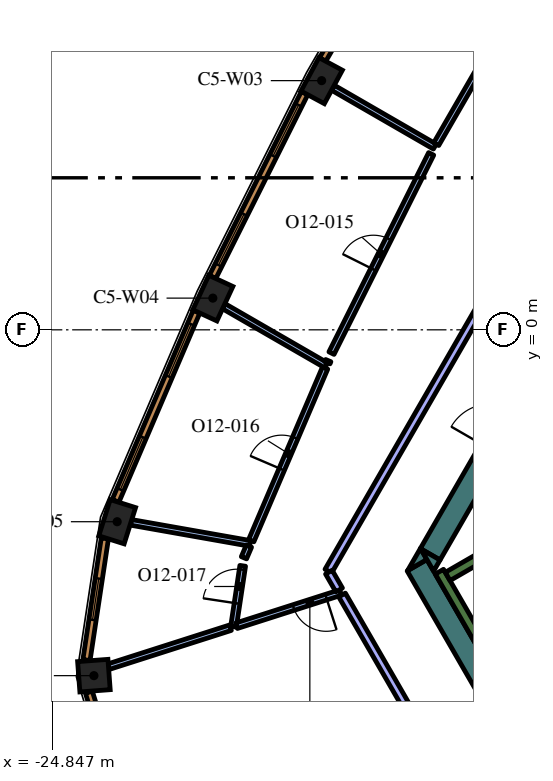
"""IFC4 building model, lengths in metres.
Left out: names, types, materials, properties, quantities, classifications, styles, units other than length and angle.
Written with IfcOpenShell. Run it as: python <this file> out.ifc"""

import sys

from ifc_helpers import new_model, si_unit, direction, frame, frame_2d, origin, origin_2d, place, context, subcontext, project, spatial, polyline, rectangle, outline, extrude, element, fill, save


model = new_model("IFC4")
c1 = context("Model", 3, precision=1e-05, world=origin(), true_north=direction((0.0, 1.0)))
c2 = subcontext(c1, "Body", "Model", "MODEL_VIEW")
j1 = project(units=[si_unit("LENGTHUNIT", "METRE"), si_unit("PLANEANGLEUNIT", "RADIAN")], contexts=[c1])
p1 = place(None, origin())
s1 = spatial("IfcSite", under=j1, at=p1, CompositionType="ELEMENT")
p2 = place(p1, origin())
s2 = spatial("IfcBuilding", under=s1, at=p2, CompositionType="ELEMENT")
p3 = place(p2, frame((0.0, 0.0, 279.6)))
s3 = spatial("IfcBuildingStorey", under=s2, at=p3, CompositionType="ELEMENT", Elevation=279.6)
for number, where, z_axis, x_axis in (
    (1, (-17.756, 6.557, 0.0), (0.0, 0.0, 1.0), (-0.474, -0.881, 0.0)),
    (2, (-20.619, 0.834, 0.0), (0.0, 0.0, 1.0), (-0.421, -0.907, 0.0)),
    (3, (-23.136, -5.049, 0.0), (0.0, 0.0, 1.0), (-0.3, -0.954, 0.0)),
):
    element("IfcColumn", number, at=place(p3, frame(where, z_axis=z_axis, x_axis=x_axis)), inside=s3, PredefinedType="COLUMN", context=c2, shape_type="SweptSolid", body=[
        extrude(rectangle(XDim=1.0, YDim=0.7, at=origin_2d()), origin(), (0.0, 0.0, 1.0), 4.2),
    ])
p4 = place(p3, frame((-23.748, -9.1, 0.0), z_axis=(0.0, 0.0, 1.0), x_axis=(0.074510546573, -0.997220225652, 0.0)))
e4 = element("IfcColumn", 4, at=p4, inside=s3, PredefinedType="COLUMN", context=c2, shape_type="SweptSolid", body=[
    extrude(rectangle(XDim=0.8, YDim=0.8, at=origin_2d()), origin(), (0.0, 0.0, 1.0), 4.2),
])
p5 = place(p3, frame((-13.333, -9.506, 0.0), z_axis=(0.0, 0.0, 1.0), x_axis=(-0.500019073792, 0.866014391245, 0.0)))
e5 = element("IfcWall", 5, at=p5, inside=s3, PredefinedType="SOLIDWALL", context=c2, shape_type="SweptSolid", body=[
    extrude(rectangle(XDim=3.823, YDim=0.6, at=frame_2d((1.912, 0.0))), origin(), (0.0, 0.0, 1.0), 4.2),
])
p6 = place(p3, origin())
e6 = element("IfcWall", 6, at=p6, inside=s3, PredefinedType="SOLIDWALL", context=c2, shape_type="SweptSolid", body=[
    extrude(outline(polyline([(-14.987, -6.043), (-15.493, -6.335), (-15.156, -5.75), (-14.987, -6.043)])), origin(), (0.0, 0.0, 1.0), 4.2),
])
p7 = place(p3, frame((-13.432, -3.364, 0.0), z_axis=(0.0, 0.0, 1.0), x_axis=(-0.499960127962, -0.866048422692, 0.0)))
e7 = element("IfcWall", 7, at=p7, inside=s3, PredefinedType="SOLIDWALL", context=c2, shape_type="SweptSolid", body=[
    extrude(rectangle(XDim=2.934, YDim=0.6, at=frame_2d((1.467, 0.0))), origin(), (0.0, 0.0, 1.0), 4.2),
])
e8 = element("IfcWall", 8, at=p6, inside=s3, PredefinedType="SOLIDWALL", context=c2, shape_type="SweptSolid", body=[
    extrude(outline(polyline([(-14.809, -6.35), (-15.147, -5.764), (-14.64, -6.057), (-14.809, -6.35)])), origin(), (0.0, 0.0, 1.0), 4.2),
])
p8 = place(p3, frame((-12.84, -9.511, 0.0), z_axis=(0.0, 0.0, 1.0), x_axis=(-0.499997733992, 0.866026712061, 0.0)))
e9 = element("IfcWall", 9, at=p8, inside=s3, PredefinedType="SOLIDWALL", context=c2, shape_type="SweptSolid", body=[
    extrude(rectangle(XDim=3.634, YDim=0.25, at=frame_2d((1.817, 0.0))), origin(), (0.0, 0.0, 1.0), 4.2),
])
p9 = place(p3, frame((-14.44, -6.49, 0.0), z_axis=(0.0, 0.0, 1.0), x_axis=(0.866022966069, 0.500004222222, 0.0)))
e10 = element("IfcWall", 10, at=p9, inside=s3, PredefinedType="SOLIDWALL", context=c2, shape_type="SweptSolid", body=[
    extrude(rectangle(XDim=6.8, YDim=0.25, at=frame_2d((3.4, 0.0))), origin(), (0.0, 0.0, 1.0), 4.2),
])
p10 = place(p3, frame((-14.777, 4.822, 0.0), z_axis=(0.0, 0.0, 1.0), x_axis=(-0.865992557167, 0.500056887695, 0.0)))
e11 = element("IfcWall", 11, at=p10, inside=s3, PredefinedType="PARTITIONING", context=c2, shape_type="SweptSolid", body=[
    extrude(rectangle(XDim=3.096, YDim=0.15, at=frame_2d((1.548, 0.0))), origin(), (0.0, 0.0, 1.0), 3.55),
])
p11 = place(p3, frame((-14.74, 4.887, 0.0), z_axis=(0.0, 0.0, 1.0), x_axis=(0.500007141444, 0.86602128063, 0.0)))
e12 = element("IfcWall", 12, at=p11, inside=s3, PredefinedType="PARTITIONING", context=c2, shape_type="SweptSolid", body=[
    extrude(rectangle(XDim=6.137, YDim=0.15, at=frame_2d((3.068, 0.0))), origin(), (0.0, 0.0, 1.0), 3.55),
])
p12 = place(p11, frame((2.637, 0.0, 0.0)))
e13 = element("IfcOpeningElement", 13, at=p12, cuts=e12, PredefinedType="OPENING", context=c2, shape_type="SweptSolid", body=[
    extrude(rectangle(XDim=0.9, YDim=2.1, at=frame_2d((0.45, 1.05))), frame((0.0, 0.085, 0.0), z_axis=(0.0, -1.0, 0.0), x_axis=(1.0, 0.0, 0.0)), (0.0, 0.0, 1.0), 0.17),
])
p13 = place(p3, frame((-17.635, -0.936, 0.0), z_axis=(0.0, 0.0, 1.0), x_axis=(-0.866044607523, 0.499966736674, 0.0)))
e14 = element("IfcWall", 14, at=p13, inside=s3, PredefinedType="PARTITIONING", context=c2, shape_type="SweptSolid", body=[
    extrude(rectangle(XDim=3.115, YDim=0.15, at=frame_2d((1.557, 0.0))), origin(), (0.0, 0.0, 1.0), 3.55),
])
p14 = place(p3, frame((-17.497, -0.613, 0.0), z_axis=(0.0, 0.0, 1.0), x_axis=(0.447480081559, 0.89429389834, 0.0)))
e15 = element("IfcWall", 15, at=p14, inside=s3, PredefinedType="PARTITIONING", context=c2, shape_type="SweptSolid", body=[
    extrude(rectangle(XDim=5.863, YDim=0.15, at=frame_2d((2.931, 0.0))), origin(), (0.0, 0.0, 1.0), 3.55),
])
p15 = place(p14, frame((2.463, 0.0, 0.0)))
e16 = element("IfcOpeningElement", 16, at=p15, cuts=e15, PredefinedType="OPENING", context=c2, shape_type="SweptSolid", body=[
    extrude(rectangle(XDim=0.9, YDim=2.1, at=frame_2d((0.45, 1.05))), frame((0.0, 0.085, 0.0), z_axis=(0.0, -1.0, 0.0), x_axis=(1.0, 0.0, 0.0)), (0.0, 0.0, 1.0), 0.17),
])
p16 = place(p3, frame((-17.581, -0.81, 0.0), z_axis=(0.0, 0.0, 1.0), x_axis=(-0.390033474923, -0.92080067791, 0.0)))
e17 = element("IfcWall", 17, at=p16, inside=s3, PredefinedType="PARTITIONING", context=c2, shape_type="SweptSolid", body=[
    extrude(rectangle(XDim=0.061, YDim=0.15, at=frame_2d((0.03, 0.0))), origin(), (0.0, 0.0, 1.0), 3.55),
])
p17 = place(p3, frame((-19.639, -5.62, 0.0), z_axis=(0.0, 0.0, 1.0), x_axis=(-0.984765028635, 0.173890305586, 0.0)))
e18 = element("IfcWall", 18, at=p17, inside=s3, PredefinedType="PARTITIONING", context=c2, shape_type="SweptSolid", body=[
    extrude(rectangle(XDim=3.184, YDim=0.15, at=frame_2d((1.592, 0.0))), origin(), (0.0, 0.0, 1.0), 3.55),
])
p18 = place(p3, frame((-19.608, -5.549, 0.0), z_axis=(0.0, 0.0, 1.0), x_axis=(0.393352855097, 0.919387584964, 0.0)))
e19 = element("IfcWall", 19, at=p18, inside=s3, PredefinedType="PARTITIONING", context=c2, shape_type="SweptSolid", body=[
    extrude(rectangle(XDim=4.942, YDim=0.15, at=frame_2d((2.471, 0.0))), origin(), (0.0, 0.0, 1.0), 3.55),
])
p19 = place(p18, frame((2.042, 0.0, 0.0)))
e20 = element("IfcOpeningElement", 20, at=p19, cuts=e19, PredefinedType="OPENING", context=c2, shape_type="SweptSolid", body=[
    extrude(rectangle(XDim=0.9, YDim=2.1, at=frame_2d((0.45, 1.05))), frame((0.0, 0.085, 0.0), z_axis=(0.0, -1.0, 0.0), x_axis=(1.0, 0.0, 0.0)), (0.0, 0.0, 1.0), 0.17),
])
p20 = place(p3, frame((-19.669, -5.69, 0.0), z_axis=(0.0, 0.0, 1.0), x_axis=(-0.393566769146, -0.919296034052, 0.0)))
e21 = element("IfcWall", 21, at=p20, inside=s3, PredefinedType="PARTITIONING", context=c2, shape_type="SweptSolid", body=[
    extrude(rectangle(XDim=0.334, YDim=0.15, at=frame_2d((0.167, 0.0))), origin(), (0.0, 0.0, 1.0), 3.55),
])
p21 = place(p3, frame((-20.074, -7.812, 0.0), z_axis=(0.0, 0.0, 1.0), x_axis=(0.149305499664, 0.988791114326, 0.0)))
e22 = element("IfcWall", 22, at=p21, inside=s3, PredefinedType="PARTITIONING", context=c2, shape_type="SweptSolid", body=[
    extrude(rectangle(XDim=1.62, YDim=0.15, at=frame_2d((0.81, 0.0))), origin(), (0.0, 0.0, 1.0), 3.55),
])
p22 = place(p21, frame((0.621, 0.0, 0.0)))
e23 = element("IfcOpeningElement", 23, at=p22, cuts=e22, PredefinedType="OPENING", context=c2, shape_type="SweptSolid", body=[
    extrude(rectangle(XDim=0.9, YDim=2.1, at=frame_2d((0.45, 1.05))), frame((0.0, 0.085, 0.0), z_axis=(0.0, -1.0, 0.0), x_axis=(1.0, 0.0, 0.0)), (0.0, 0.0, 1.0), 0.17),
])
p23 = place(p3, frame((-20.154, -7.838, 0.0), z_axis=(0.0, 0.0, 1.0), x_axis=(-0.952501497002, -0.304533903217, 0.0)))
e24 = element("IfcWall", 24, at=p23, inside=s3, PredefinedType="PARTITIONING", context=c2, shape_type="SweptSolid", body=[
    extrude(rectangle(XDim=3.37, YDim=0.15, at=frame_2d((1.685, 0.0))), origin(), (0.0, 0.0, 1.0), 3.55),
])
p24 = place(p3, frame((-17.256, -6.911, 0.0), z_axis=(0.0, 0.0, 1.0), x_axis=(-0.95247639241, -0.304612412587, 0.0)))
e25 = element("IfcWall", 25, at=p24, inside=s3, PredefinedType="PARTITIONING", context=c2, shape_type="SweptSolid", body=[
    extrude(rectangle(XDim=2.875, YDim=0.15, at=frame_2d((1.438, 0.0))), origin(), (0.0, 0.0, 1.0), 3.55),
])
p25 = place(p24, frame((0.4, 0.0, 0.0)))
e26 = element("IfcOpeningElement", 26, at=p25, cuts=e25, PredefinedType="OPENING", context=c2, shape_type="SweptSolid", body=[
    extrude(rectangle(XDim=0.9, YDim=2.1, at=frame_2d((0.45, 1.05))), frame((0.0, 0.085, 0.0), z_axis=(0.0, -1.0, 0.0), x_axis=(1.0, 0.0, 0.0)), (0.0, 0.0, 1.0), 0.17),
])
p26 = place(p3, frame((-13.451, 0.803, 0.0), z_axis=(0.0, 0.0, 1.0), x_axis=(-0.499982585408, -0.86603545787, 0.0)))
e27 = element("IfcWall", 27, at=p26, inside=s3, PredefinedType="PARTITIONING", context=c2, shape_type="SweptSolid", body=[
    extrude(rectangle(XDim=8.26, YDim=0.2, at=frame_2d((4.13, 0.0))), origin(), (0.0, 0.0, 1.0), 3.55),
])
p27 = place(p3, frame((-17.565, -6.376, 0.0), z_axis=(0.0, 0.0, 1.0), x_axis=(0.499683376352, -0.866208129376, 0.0)))
e28 = element("IfcWall", 28, at=p27, inside=s3, PredefinedType="PARTITIONING", context=c2, shape_type="SweptSolid", body=[
    extrude(rectangle(XDim=0.541, YDim=0.2, at=frame_2d((0.271, 0.0))), origin(), (0.0, 0.0, 1.0), 3.55),
])
p28 = place(p3, frame((-17.218, -6.978, 0.0), z_axis=(0.0, 0.0, 1.0), x_axis=(0.500012299885, -0.866018302326, 0.0)))
e29 = element("IfcWall", 29, at=p28, inside=s3, PredefinedType="PARTITIONING", context=c2, shape_type="SweptSolid", body=[
    extrude(rectangle(XDim=5.857, YDim=0.2, at=frame_2d((2.929, 0.0))), origin(), (0.0, 0.0, 1.0), 3.55),
])
p29 = place(p3, frame((-15.025, 11.796, 0.0), z_axis=(0.0, 0.0, 1.0), x_axis=(-0.500024767483, -0.866011103799, 0.0)))
e30 = element("IfcWall", 30, at=p29, inside=s3, PredefinedType="SOLIDWALL", context=c2, shape_type="SweptSolid", body=[
    extrude(rectangle(XDim=5.406, YDim=0.19, at=frame_2d((2.703, 0.0))), origin(), (0.0, 0.0, 1.0), 3.95),
])
p30 = place(p29, frame((0.346, 0.0, 0.6)))
e31 = element("IfcOpeningElement", 31, at=p30, cuts=e30, PredefinedType="OPENING", context=c2, shape_type="SweptSolid", body=[
    extrude(rectangle(XDim=1.5, YDim=2.85, at=frame_2d((0.75, 1.425))), frame((0.0, 0.105, 0.0), z_axis=(0.0, -1.0, 0.0), x_axis=(1.0, 0.0, 0.0)), (0.0, 0.0, 1.0), 0.21),
])
p31 = place(p29, frame((3.559, 0.0, 0.6)))
e32 = element("IfcOpeningElement", 32, at=p31, cuts=e30, PredefinedType="OPENING", context=c2, shape_type="SweptSolid", body=[
    extrude(rectangle(XDim=1.5, YDim=2.85, at=frame_2d((0.75, 1.425))), frame((0.0, 0.105, 0.0), z_axis=(0.0, -1.0, 0.0), x_axis=(1.0, 0.0, 0.0)), (0.0, 0.0, 1.0), 0.21),
])
p32 = place(p3, frame((-18.206, 6.227, 0.0), z_axis=(0.0, 0.0, 1.0), x_axis=(-0.447484531401, -0.894291671747, 0.0)))
e33 = element("IfcWall", 33, at=p32, inside=s3, PredefinedType="SOLIDWALL", context=c2, shape_type="SweptSolid", body=[
    extrude(rectangle(XDim=5.406, YDim=0.19, at=frame_2d((2.703, 0.0))), origin(), (0.0, 0.0, 1.0), 3.95),
])
p33 = place(p32, frame((0.346, 0.0, 0.6)))
e34 = element("IfcOpeningElement", 34, at=p33, cuts=e33, PredefinedType="OPENING", context=c2, shape_type="SweptSolid", body=[
    extrude(rectangle(XDim=1.5, YDim=2.85, at=frame_2d((0.75, 1.425))), frame((0.0, 0.105, 0.0), z_axis=(0.0, -1.0, 0.0), x_axis=(1.0, 0.0, 0.0)), (0.0, 0.0, 1.0), 0.21),
])
p34 = place(p32, frame((3.559, 0.0, 0.6)))
e35 = element("IfcOpeningElement", 35, at=p34, cuts=e33, PredefinedType="OPENING", context=c2, shape_type="SweptSolid", body=[
    extrude(rectangle(XDim=1.5, YDim=2.85, at=frame_2d((0.75, 1.425))), frame((0.0, 0.105, 0.0), z_axis=(0.0, -1.0, 0.0), x_axis=(1.0, 0.0, 0.0)), (0.0, 0.0, 1.0), 0.21),
])
p35 = place(p3, frame((-21.049, 0.478, 0.0), z_axis=(0.0, 0.0, 1.0), x_axis=(-0.393347848476, -0.919389726992, 0.0)))
e36 = element("IfcWall", 36, at=p35, inside=s3, PredefinedType="SOLIDWALL", context=c2, shape_type="SweptSolid", body=[
    extrude(rectangle(XDim=5.415, YDim=0.19, at=frame_2d((2.708, 0.0))), origin(), (0.0, 0.0, 1.0), 3.95),
])
p36 = place(p35, frame((0.357, 0.0, 0.6)))
e37 = element("IfcOpeningElement", 37, at=p36, cuts=e36, PredefinedType="OPENING", context=c2, shape_type="SweptSolid", body=[
    extrude(rectangle(XDim=1.5, YDim=2.85, at=frame_2d((0.75, 1.425))), frame((0.0, 0.105, 0.0), z_axis=(0.0, -1.0, 0.0), x_axis=(1.0, 0.0, 0.0)), (0.0, 0.0, 1.0), 0.21),
])
p37 = place(p35, frame((3.593, 0.0, 0.6)))
e38 = element("IfcOpeningElement", 38, at=p37, cuts=e36, PredefinedType="OPENING", context=c2, shape_type="SweptSolid", body=[
    extrude(rectangle(XDim=1.5, YDim=2.85, at=frame_2d((0.75, 1.425))), frame((0.0, 0.105, 0.0), z_axis=(0.0, -1.0, 0.0), x_axis=(1.0, 0.0, 0.0)), (0.0, 0.0, 1.0), 0.21),
])
p38 = place(p3, frame((-23.46, -5.488, 0.0), z_axis=(0.0, 0.0, 1.0), x_axis=(-0.149421055602, -0.988773658702, 0.0)))
e39 = element("IfcWall", 39, at=p38, inside=s3, PredefinedType="SOLIDWALL", context=c2, shape_type="SweptSolid", body=[
    extrude(rectangle(XDim=3.237, YDim=0.19, at=frame_2d((1.618, 0.0))), origin(), (0.0, 0.0, 1.0), 3.95),
])
p39 = place(p38, frame((1.068, 0.0, 0.6)))
e40 = element("IfcOpeningElement", 40, at=p39, cuts=e39, PredefinedType="OPENING", context=c2, shape_type="SweptSolid", body=[
    extrude(rectangle(XDim=1.1, YDim=2.85, at=frame_2d((0.55, 1.425))), frame((0.0, 0.105, 0.0), z_axis=(0.0, -1.0, 0.0), x_axis=(1.0, 0.0, 0.0)), (0.0, 0.0, 1.0), 0.21),
])
p40 = place(p3, frame((-23.881, -9.535, 0.0), z_axis=(0.0, 0.0, 1.0), x_axis=(0.294706210429, -0.9555879078, 0.0)))
e41 = element("IfcWall", 41, at=p40, inside=s3, PredefinedType="SOLIDWALL", context=c2, shape_type="SweptSolid", body=[
    extrude(rectangle(XDim=2.627, YDim=0.19, at=frame_2d((1.313, 0.0))), origin(), (0.0, 0.0, 1.0), 3.95),
])
p41 = place(p40, frame((0.763, 0.0, 0.6)))
e42 = element("IfcOpeningElement", 42, at=p41, cuts=e41, PredefinedType="OPENING", context=c2, shape_type="SweptSolid", body=[
    extrude(rectangle(XDim=1.1, YDim=2.85, at=frame_2d((0.55, 1.425))), frame((0.0, 0.105, 0.0), z_axis=(0.0, -1.0, 0.0), x_axis=(1.0, 0.0, 0.0)), (0.0, 0.0, 1.0), 0.21),
])
p42 = place(p15, origin())
e43 = element("IfcDoor", 43, at=p42, inside=s3, OperationType="SINGLE_SWING_LEFT", PredefinedType="DOOR", context=c2, shape_type="SweptSolid", body=[
    extrude(rectangle(XDim=0.9, YDim=2.1, at=frame_2d((0.45, 1.05))), frame((0.0, 0.025, 0.0), z_axis=(0.0, -1.0, 0.0), x_axis=(1.0, 0.0, 0.0)), (0.0, 0.0, 1.0), 0.05),
])
fill(e16, e43)
p43 = place(p19, origin())
e44 = element("IfcDoor", 44, at=p43, inside=s3, OperationType="SINGLE_SWING_RIGHT", PredefinedType="DOOR", context=c2, shape_type="SweptSolid", body=[
    extrude(rectangle(XDim=0.9, YDim=2.1, at=frame_2d((0.45, 1.05))), frame((0.0, 0.025, 0.0), z_axis=(0.0, -1.0, 0.0), x_axis=(1.0, 0.0, 0.0)), (0.0, 0.0, 1.0), 0.05),
])
fill(e20, e44)
p44 = place(p22, origin())
e45 = element("IfcDoor", 45, at=p44, inside=s3, OperationType="SINGLE_SWING_RIGHT", PredefinedType="DOOR", context=c2, shape_type="SweptSolid", body=[
    extrude(rectangle(XDim=0.9, YDim=2.1, at=frame_2d((0.45, 1.05))), frame((0.0, 0.025, 0.0), z_axis=(0.0, -1.0, 0.0), x_axis=(1.0, 0.0, 0.0)), (0.0, 0.0, 1.0), 0.05),
])
fill(e23, e45)
p45 = place(p25, origin())
e46 = element("IfcDoor", 46, at=p45, inside=s3, OperationType="SINGLE_SWING_LEFT", PredefinedType="DOOR", context=c2, shape_type="SweptSolid", body=[
    extrude(rectangle(XDim=0.9, YDim=2.1, at=frame_2d((0.45, 1.05))), frame((0.0, 0.025, 0.0), z_axis=(0.0, -1.0, 0.0), x_axis=(1.0, 0.0, 0.0)), (0.0, 0.0, 1.0), 0.05),
])
fill(e26, e46)
p46 = place(p33, origin())
e47 = element("IfcWindow", 47, at=p46, inside=s3, PartitioningType="SINGLE_PANEL", PredefinedType="WINDOW", context=c2, shape_type="SweptSolid", body=[
    extrude(rectangle(XDim=1.5, YDim=2.85, at=frame_2d((0.75, 1.425))), frame((0.0, 0.045, 0.0), z_axis=(0.0, -1.0, 0.0), x_axis=(1.0, 0.0, 0.0)), (0.0, 0.0, 1.0), 0.06),
])
fill(e34, e47)
p47 = place(p34, origin())
e48 = element("IfcWindow", 48, at=p47, inside=s3, PartitioningType="SINGLE_PANEL", PredefinedType="WINDOW", context=c2, shape_type="SweptSolid", body=[
    extrude(rectangle(XDim=1.5, YDim=2.85, at=frame_2d((0.75, 1.425))), frame((0.0, 0.045, 0.0), z_axis=(0.0, -1.0, 0.0), x_axis=(1.0, 0.0, 0.0)), (0.0, 0.0, 1.0), 0.06),
])
fill(e35, e48)
p48 = place(p36, origin())
e49 = element("IfcWindow", 49, at=p48, inside=s3, PartitioningType="SINGLE_PANEL", PredefinedType="WINDOW", context=c2, shape_type="SweptSolid", body=[
    extrude(rectangle(XDim=1.5, YDim=2.85, at=frame_2d((0.75, 1.425))), frame((0.0, 0.045, 0.0), z_axis=(0.0, -1.0, 0.0), x_axis=(1.0, 0.0, 0.0)), (0.0, 0.0, 1.0), 0.06),
])
fill(e37, e49)
p49 = place(p37, origin())
e50 = element("IfcWindow", 50, at=p49, inside=s3, PartitioningType="SINGLE_PANEL", PredefinedType="WINDOW", context=c2, shape_type="SweptSolid", body=[
    extrude(rectangle(XDim=1.5, YDim=2.85, at=frame_2d((0.75, 1.425))), frame((0.0, 0.045, 0.0), z_axis=(0.0, -1.0, 0.0), x_axis=(1.0, 0.0, 0.0)), (0.0, 0.0, 1.0), 0.06),
])
fill(e38, e50)
p50 = place(p39, origin())
e51 = element("IfcWindow", 51, at=p50, inside=s3, PartitioningType="SINGLE_PANEL", PredefinedType="WINDOW", context=c2, shape_type="SweptSolid", body=[
    extrude(rectangle(XDim=1.1, YDim=2.85, at=frame_2d((0.55, 1.425))), frame((0.0, 0.045, 0.0), z_axis=(0.0, -1.0, 0.0), x_axis=(1.0, 0.0, 0.0)), (0.0, 0.0, 1.0), 0.06),
])
fill(e40, e51)
save(model, sys.argv[1])
